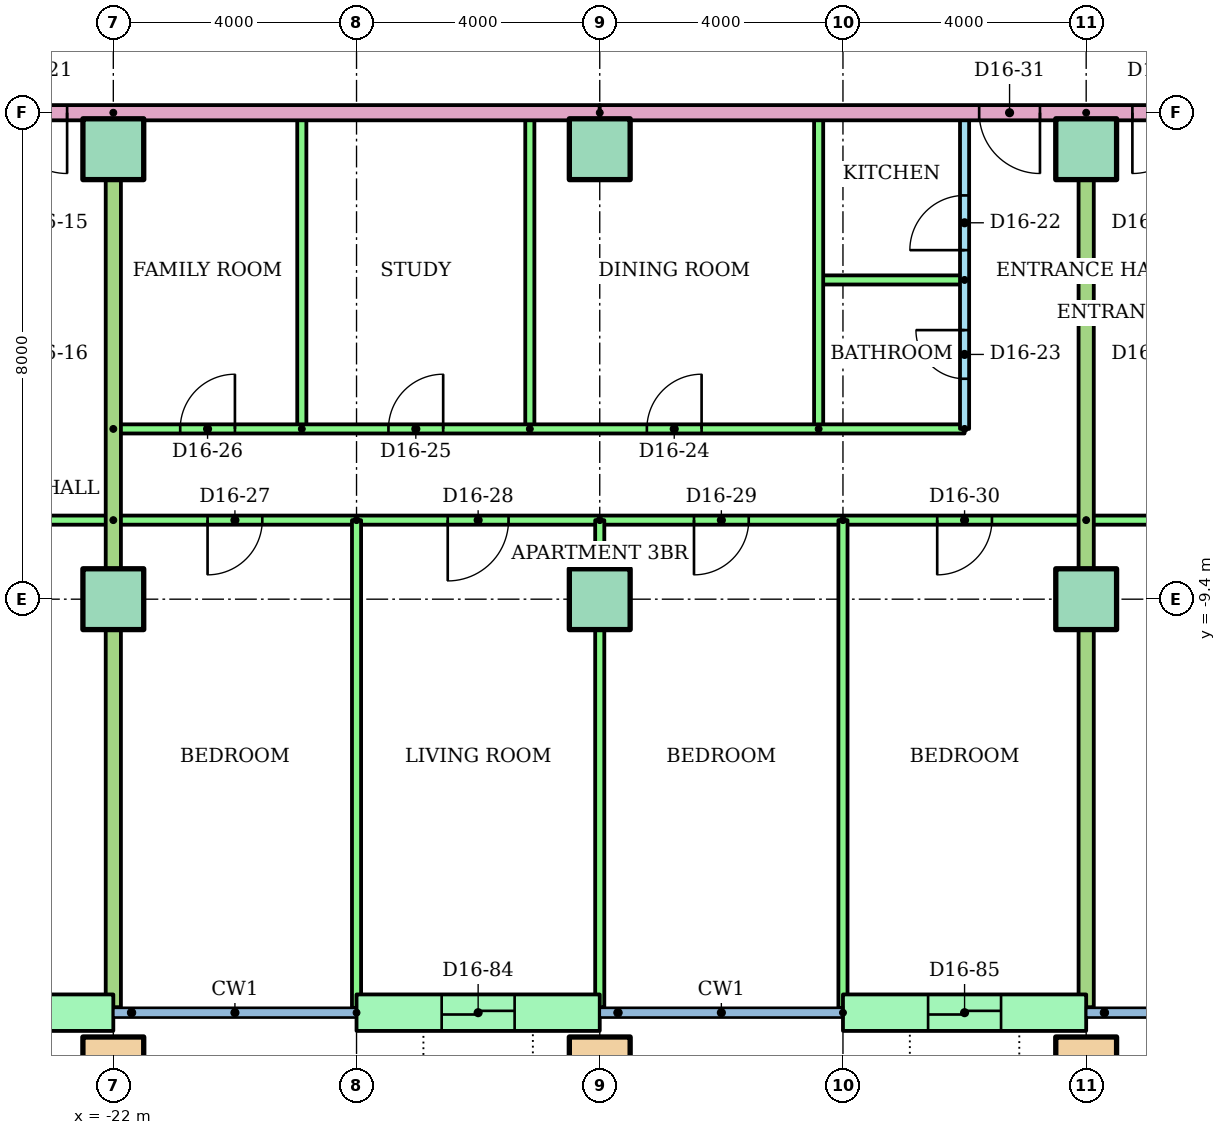
"""IFC4 building model, lengths in metres.
Left out: names, types, materials, properties, quantities, classifications, styles, units other than length and angle.
Written with IfcOpenShell. Run it as: python <this file> out.ifc"""

import sys

from ifc_helpers import new_model, si_unit, direction, frame, frame_2d, origin, origin_2d, place, context, subcontext, project, spatial, rectangle, hollow_rectangle, extrude, element, fill, save


model = new_model("IFC4")
c1 = context("Model", 3, precision=1e-05, world=origin(), true_north=direction((0.0, 1.0)))
c2 = subcontext(c1, "Body", "Model", "MODEL_VIEW")
j1 = project(units=[si_unit("LENGTHUNIT", "METRE"), si_unit("PLANEANGLEUNIT", "RADIAN")], contexts=[c1])
p1 = place(None, origin())
s1 = spatial("IfcSite", under=j1, at=p1, CompositionType="ELEMENT")
p2 = place(p1, origin())
s2 = spatial("IfcBuilding", under=s1, at=p2, CompositionType="ELEMENT")
p3 = place(p2, frame((0.0, 0.0, 60.8)))
s3 = spatial("IfcBuildingStorey", under=s2, at=p3, CompositionType="ELEMENT", Elevation=60.8)
for number, where in (
    (1, (-22.0, -17.1, 0.0)),
    (2, (-14.0, -17.1, 0.0)),
    (3, (-6.0, -17.1, 0.0)),
):
    element("IfcColumn", number, at=place(p3, frame(where)), inside=s3, PredefinedType="COLUMN", context=c2, shape_type="SweptSolid", body=[
        extrude(hollow_rectangle(XDim=1.0, YDim=1.0, WallThickness=0.05, at=origin_2d()), origin(), (0.0, 0.0, 1.0), 3.2),
    ])
for number, where in (
    (4, (-22.0, -9.4, 0.0)),
    (5, (-14.0, -9.4, 0.0)),
    (6, (-6.0, -9.4, 0.0)),
    (7, (-22.0, -2.0, 0.0)),
    (8, (-14.0, -2.0, 0.0)),
    (9, (-6.0, -2.0, 0.0)),
):
    element("IfcColumn", number, at=place(p3, frame(where)), inside=s3, PredefinedType="COLUMN", context=c2, shape_type="SweptSolid", body=[
        extrude(rectangle(XDim=1.0, YDim=1.0, at=origin_2d()), origin(), (0.0, 0.0, 1.0), 3.2),
    ])
p4 = place(p3, frame((-26.0, -16.2, 0.0)))
e10 = element("IfcWall", 10, at=p4, inside=s3, PredefinedType="STANDARD", context=c2, shape_type="SweptSolid", body=[
    extrude(rectangle(XDim=4.0, YDim=0.6, at=frame_2d((2.0, 0.0))), origin(), (0.0, 0.0, 1.0), 2.8),
])
p5 = place(p4, frame((1.4, 0.0, 0.0)))
e11 = element("IfcOpeningElement", 11, at=p5, cuts=e10, PredefinedType="OPENING", context=c2, shape_type="SweptSolid", body=[
    extrude(rectangle(XDim=1.2, YDim=2.1, at=frame_2d((0.6, 1.05))), frame((0.0, 0.31, 0.0), z_axis=(0.0, -1.0, 0.0), x_axis=(1.0, 0.0, 0.0)), (0.0, 0.0, 1.0), 0.62),
])
p6 = place(p3, frame((-18.0, -16.2, 0.0)))
e12 = element("IfcWall", 12, at=p6, inside=s3, PredefinedType="STANDARD", context=c2, shape_type="SweptSolid", body=[
    extrude(rectangle(XDim=4.0, YDim=0.6, at=frame_2d((2.0, 0.0))), origin(), (0.0, 0.0, 1.0), 2.8),
])
p7 = place(p6, frame((1.4, 0.0, 0.0)))
e13 = element("IfcOpeningElement", 13, at=p7, cuts=e12, PredefinedType="OPENING", context=c2, shape_type="SweptSolid", body=[
    extrude(rectangle(XDim=1.2, YDim=2.1, at=frame_2d((0.6, 1.05))), frame((0.0, 0.31, 0.0), z_axis=(0.0, -1.0, 0.0), x_axis=(1.0, 0.0, 0.0)), (0.0, 0.0, 1.0), 0.62),
])
p8 = place(p3, frame((-10.0, -16.2, 0.0)))
e14 = element("IfcWall", 14, at=p8, inside=s3, PredefinedType="STANDARD", context=c2, shape_type="SweptSolid", body=[
    extrude(rectangle(XDim=4.0, YDim=0.6, at=frame_2d((2.0, 0.0))), origin(), (0.0, 0.0, 1.0), 2.8),
])
p9 = place(p8, frame((1.4, 0.0, 0.0)))
e15 = element("IfcOpeningElement", 15, at=p9, cuts=e14, PredefinedType="OPENING", context=c2, shape_type="SweptSolid", body=[
    extrude(rectangle(XDim=1.2, YDim=2.1, at=frame_2d((0.6, 1.05))), frame((0.0, 0.31, 0.0), z_axis=(0.0, -1.0, 0.0), x_axis=(1.0, 0.0, 0.0)), (0.0, 0.0, 1.0), 0.62),
])
p10 = place(p3, frame((-22.0, -8.1, 0.0), z_axis=(0.0, 0.0, 1.0), x_axis=(-1.0, 0.0, 0.0)))
e16 = element("IfcWall", 16, at=p10, inside=s3, PredefinedType="PARTITIONING", context=c2, shape_type="SweptSolid", body=[
    extrude(rectangle(XDim=14.51, YDim=0.15, at=frame_2d((7.255, 0.0))), origin(), (0.0, 0.0, 1.0), 2.4),
])
p11 = place(p10, frame((11.6, 0.0, 0.0)))
e17 = element("IfcOpeningElement", 17, at=p11, cuts=e16, PredefinedType="OPENING", context=c2, shape_type="SweptSolid", body=[
    extrude(rectangle(XDim=0.9, YDim=2.1, at=frame_2d((0.45, 1.05))), frame((0.0, 0.085, 0.0), z_axis=(0.0, -1.0, 0.0), x_axis=(1.0, 0.0, 0.0)), (0.0, 0.0, 1.0), 0.17),
])
p12 = place(p10, frame((4.4, 0.0, 0.0)))
e18 = element("IfcOpeningElement", 18, at=p12, cuts=e16, PredefinedType="OPENING", context=c2, shape_type="SweptSolid", body=[
    extrude(rectangle(XDim=1.0, YDim=2.1, at=frame_2d((0.5, 1.05))), frame((0.0, 0.085, 0.0), z_axis=(0.0, -1.0, 0.0), x_axis=(1.0, 0.0, 0.0)), (0.0, 0.0, 1.0), 0.17),
])
p13 = place(p3, frame((-8.0, -6.6, 0.0), z_axis=(0.0, 0.0, 1.0), x_axis=(0.0, 1.0, 0.0)))
e19 = element("IfcWall", 19, at=p13, inside=s3, PredefinedType="PARTITIONING", context=c2, shape_type="SweptSolid", body=[
    extrude(rectangle(XDim=5.2, YDim=0.15, at=frame_2d((2.6, 0.0))), origin(), (0.0, 0.0, 1.0), 2.4),
])
p14 = place(p13, frame((2.94, 0.0, 0.0)))
e20 = element("IfcOpeningElement", 20, at=p14, cuts=e19, PredefinedType="OPENING", context=c2, shape_type="SweptSolid", body=[
    extrude(rectangle(XDim=0.9, YDim=2.1, at=frame_2d((0.45, 1.05))), frame((0.0, 0.085, 0.0), z_axis=(0.0, -1.0, 0.0), x_axis=(1.0, 0.0, 0.0)), (0.0, 0.0, 1.0), 0.17),
])
p15 = place(p13, frame((0.825, 0.0, 0.0)))
e21 = element("IfcOpeningElement", 21, at=p15, cuts=e19, PredefinedType="OPENING", context=c2, shape_type="SweptSolid", body=[
    extrude(rectangle(XDim=0.8, YDim=2.1, at=frame_2d((0.4, 1.05))), frame((0.0, 0.085, 0.0), z_axis=(0.0, -1.0, 0.0), x_axis=(1.0, 0.0, 0.0)), (0.0, 0.0, 1.0), 0.17),
])
p16 = place(p3, frame((-8.0, -4.15, 0.0), z_axis=(0.0, 0.0, 1.0), x_axis=(-1.0, 0.0, 0.0)))
e22 = element("IfcWall", 22, at=p16, inside=s3, PredefinedType="PARTITIONING", context=c2, shape_type="SweptSolid", body=[
    extrude(rectangle(XDim=2.4, YDim=0.15, at=frame_2d((1.2, 0.0))), origin(), (0.0, 0.0, 1.0), 2.4),
])
for number, where, z_axis, x_axis in (
    (23, (-10.4, -6.6, 0.0), (0.0, 0.0, 1.0), (0.0, 1.0, 0.0)),
    (24, (-15.15, -6.6, 0.0), (0.0, 0.0, 1.0), (0.0, 1.0, 0.0)),
    (25, (-18.9, -6.6, 0.0), (0.0, 0.0, 1.0), (0.0, 1.0, 0.0)),
):
    element("IfcWall", number, at=place(p3, frame(where, z_axis=z_axis, x_axis=x_axis)), inside=s3, PredefinedType="PARTITIONING", context=c2, shape_type="SweptSolid", body=[
        extrude(rectangle(XDim=5.2, YDim=0.15, at=frame_2d((2.6, 0.0))), origin(), (0.0, 0.0, 1.0), 2.4),
    ])
p17 = place(p3, frame((-22.0, -6.6, 0.0)))
e26 = element("IfcWall", 26, at=p17, inside=s3, PredefinedType="PARTITIONING", context=c2, shape_type="SweptSolid", body=[
    extrude(rectangle(XDim=14.0, YDim=0.15, at=frame_2d((7.0, 0.0))), origin(), (0.0, 0.0, 1.0), 2.4),
])
p18 = place(p17, frame((8.775, 0.0, 0.0)))
e27 = element("IfcOpeningElement", 27, at=p18, cuts=e26, PredefinedType="OPENING", context=c2, shape_type="SweptSolid", body=[
    extrude(rectangle(XDim=0.9, YDim=2.1, at=frame_2d((0.45, 1.05))), frame((0.0, 0.085, 0.0), z_axis=(0.0, -1.0, 0.0), x_axis=(1.0, 0.0, 0.0)), (0.0, 0.0, 1.0), 0.17),
])
p19 = place(p17, frame((4.525, 0.0, 0.0)))
e28 = element("IfcOpeningElement", 28, at=p19, cuts=e26, PredefinedType="OPENING", context=c2, shape_type="SweptSolid", body=[
    extrude(rectangle(XDim=0.9, YDim=2.1, at=frame_2d((0.45, 1.05))), frame((0.0, 0.085, 0.0), z_axis=(0.0, -1.0, 0.0), x_axis=(1.0, 0.0, 0.0)), (0.0, 0.0, 1.0), 0.17),
])
p20 = place(p17, frame((1.1, 0.0, 0.0)))
e29 = element("IfcOpeningElement", 29, at=p20, cuts=e26, PredefinedType="OPENING", context=c2, shape_type="SweptSolid", body=[
    extrude(rectangle(XDim=0.9, YDim=2.1, at=frame_2d((0.45, 1.05))), frame((0.0, 0.085, 0.0), z_axis=(0.0, -1.0, 0.0), x_axis=(1.0, 0.0, 0.0)), (0.0, 0.0, 1.0), 0.17),
])
p21 = place(p3, frame((-6.0, -8.1, 0.0), z_axis=(0.0, 0.0, 1.0), x_axis=(-1.0, 0.0, 0.0)))
e30 = element("IfcWall", 30, at=p21, inside=s3, PredefinedType="PARTITIONING", context=c2, shape_type="SweptSolid", body=[
    extrude(rectangle(XDim=16.0, YDim=0.15, at=frame_2d((8.0, 0.0))), origin(), (0.0, 0.0, 1.0), 2.4),
])
p22 = place(p21, frame((13.55, 0.0, 0.0)))
e31 = element("IfcOpeningElement", 31, at=p22, cuts=e30, PredefinedType="OPENING", context=c2, shape_type="SweptSolid", body=[
    extrude(rectangle(XDim=0.9, YDim=2.1, at=frame_2d((0.45, 1.05))), frame((0.0, 0.085, 0.0), z_axis=(0.0, -1.0, 0.0), x_axis=(1.0, 0.0, 0.0)), (0.0, 0.0, 1.0), 0.17),
])
p23 = place(p21, frame((9.5, 0.0, 0.0)))
e32 = element("IfcOpeningElement", 32, at=p23, cuts=e30, PredefinedType="OPENING", context=c2, shape_type="SweptSolid", body=[
    extrude(rectangle(XDim=1.0, YDim=2.1, at=frame_2d((0.5, 1.05))), frame((0.0, 0.085, 0.0), z_axis=(0.0, -1.0, 0.0), x_axis=(1.0, 0.0, 0.0)), (0.0, 0.0, 1.0), 0.17),
])
p24 = place(p21, frame((5.55, 0.0, 0.0)))
e33 = element("IfcOpeningElement", 33, at=p24, cuts=e30, PredefinedType="OPENING", context=c2, shape_type="SweptSolid", body=[
    extrude(rectangle(XDim=0.9, YDim=2.1, at=frame_2d((0.45, 1.05))), frame((0.0, 0.085, 0.0), z_axis=(0.0, -1.0, 0.0), x_axis=(1.0, 0.0, 0.0)), (0.0, 0.0, 1.0), 0.17),
])
p25 = place(p21, frame((1.55, 0.0, 0.0)))
e34 = element("IfcOpeningElement", 34, at=p25, cuts=e30, PredefinedType="OPENING", context=c2, shape_type="SweptSolid", body=[
    extrude(rectangle(XDim=0.9, YDim=2.1, at=frame_2d((0.45, 1.05))), frame((0.0, 0.085, 0.0), z_axis=(0.0, -1.0, 0.0), x_axis=(1.0, 0.0, 0.0)), (0.0, 0.0, 1.0), 0.17),
])
p26 = place(p3, frame((-18.0, -8.1, 0.0), z_axis=(0.0, 0.0, 1.0), x_axis=(0.0, -1.0, 0.0)))
e35 = element("IfcWall", 35, at=p26, inside=s3, PredefinedType="PARTITIONING", context=c2, shape_type="SweptSolid", body=[
    extrude(rectangle(XDim=8.021, YDim=0.15, at=frame_2d((4.01, 0.0))), origin(), (0.0, 0.0, 1.0), 2.4),
])
p27 = place(p3, frame((-14.0, -8.1, 0.0), z_axis=(0.0, 0.0, 1.0), x_axis=(0.0, -1.0, 0.0)))
e36 = element("IfcWall", 36, at=p27, inside=s3, PredefinedType="PARTITIONING", context=c2, shape_type="SweptSolid", body=[
    extrude(rectangle(XDim=8.01, YDim=0.15, at=frame_2d((4.005, 0.0))), origin(), (0.0, 0.0, 1.0), 2.4),
])
p28 = place(p3, frame((-10.0, -8.1, 0.0), z_axis=(0.0, 0.0, 1.0), x_axis=(0.0, -1.0, 0.0)))
e37 = element("IfcWall", 37, at=p28, inside=s3, PredefinedType="PARTITIONING", context=c2, shape_type="SweptSolid", body=[
    extrude(rectangle(XDim=8.021, YDim=0.15, at=frame_2d((4.01, 0.0))), origin(), (0.0, 0.0, 1.0), 2.4),
])
p29 = place(p3, frame((-22.0, -1.4, 0.0), z_axis=(0.0, 0.0, 1.0), x_axis=(0.0, -1.0, 0.0)))
e38 = element("IfcWall", 38, at=p29, inside=s3, PredefinedType="PARTITIONING", context=c2, shape_type="SweptSolid", body=[
    extrude(rectangle(XDim=14.71, YDim=0.25, at=frame_2d((7.355, 0.0))), origin(), (0.0, 0.0, 1.0), 2.4),
])
p30 = place(p3, frame((10.0, -8.1, 0.0), z_axis=(0.0, 0.0, 1.0), x_axis=(-1.0, 0.0, 0.0)))
e39 = element("IfcWall", 39, at=p30, inside=s3, PredefinedType="PARTITIONING", context=c2, shape_type="SweptSolid", body=[
    extrude(rectangle(XDim=16.0, YDim=0.15, at=frame_2d((8.0, 0.0))), origin(), (0.0, 0.0, 1.0), 2.4),
])
p31 = place(p30, frame((13.55, 0.0, 0.0)))
e40 = element("IfcOpeningElement", 40, at=p31, cuts=e39, PredefinedType="OPENING", context=c2, shape_type="SweptSolid", body=[
    extrude(rectangle(XDim=0.9, YDim=2.1, at=frame_2d((0.45, 1.05))), frame((0.0, 0.085, 0.0), z_axis=(0.0, -1.0, 0.0), x_axis=(1.0, 0.0, 0.0)), (0.0, 0.0, 1.0), 0.17),
])
p32 = place(p30, frame((9.5, 0.0, 0.0)))
e41 = element("IfcOpeningElement", 41, at=p32, cuts=e39, PredefinedType="OPENING", context=c2, shape_type="SweptSolid", body=[
    extrude(rectangle(XDim=1.0, YDim=2.1, at=frame_2d((0.5, 1.05))), frame((0.0, 0.085, 0.0), z_axis=(0.0, -1.0, 0.0), x_axis=(1.0, 0.0, 0.0)), (0.0, 0.0, 1.0), 0.17),
])
p33 = place(p30, frame((5.55, 0.0, 0.0)))
e42 = element("IfcOpeningElement", 42, at=p33, cuts=e39, PredefinedType="OPENING", context=c2, shape_type="SweptSolid", body=[
    extrude(rectangle(XDim=0.9, YDim=2.1, at=frame_2d((0.45, 1.05))), frame((0.0, 0.085, 0.0), z_axis=(0.0, -1.0, 0.0), x_axis=(1.0, 0.0, 0.0)), (0.0, 0.0, 1.0), 0.17),
])
p34 = place(p30, frame((1.55, 0.0, 0.0)))
e43 = element("IfcOpeningElement", 43, at=p34, cuts=e39, PredefinedType="OPENING", context=c2, shape_type="SweptSolid", body=[
    extrude(rectangle(XDim=0.9, YDim=2.1, at=frame_2d((0.45, 1.05))), frame((0.0, 0.085, 0.0), z_axis=(0.0, -1.0, 0.0), x_axis=(1.0, 0.0, 0.0)), (0.0, 0.0, 1.0), 0.17),
])
p35 = place(p3, frame((-6.0, -1.4, 0.0), z_axis=(0.0, 0.0, 1.0), x_axis=(0.0, -1.0, 0.0)))
e44 = element("IfcWall", 44, at=p35, inside=s3, PredefinedType="PARTITIONING", context=c2, shape_type="SweptSolid", body=[
    extrude(rectangle(XDim=14.71, YDim=0.25, at=frame_2d((7.355, 0.0))), origin(), (0.0, 0.0, 1.0), 2.4),
])
p36 = place(p3, frame((-14.0, -1.4, 0.0), z_axis=(0.0, 0.0, 1.0), x_axis=(-1.0, 0.0, 0.0)))
e45 = element("IfcWall", 45, at=p36, inside=s3, PredefinedType="PARTITIONING", context=c2, shape_type="SweptSolid", body=[
    extrude(rectangle(XDim=15.0, YDim=0.25, at=frame_2d((7.5, 0.0))), origin(), (0.0, 0.0, 1.0), 2.4),
])
p37 = place(p36, frame((8.76, 0.0, 0.0)))
e46 = element("IfcOpeningElement", 46, at=p37, cuts=e45, PredefinedType="OPENING", context=c2, shape_type="SweptSolid", body=[
    extrude(rectangle(XDim=1.0, YDim=2.1, at=frame_2d((0.5, 1.05))), frame((0.0, 0.135, 0.0), z_axis=(0.0, -1.0, 0.0), x_axis=(1.0, 0.0, 0.0)), (0.0, 0.0, 1.0), 0.27),
])
p38 = place(p3, frame((14.0, -1.4, 0.0), z_axis=(0.0, 0.0, 1.0), x_axis=(-1.0, 0.0, 0.0)))
e47 = element("IfcWall", 47, at=p38, inside=s3, PredefinedType="PARTITIONING", context=c2, shape_type="SweptSolid", body=[
    extrude(rectangle(XDim=28.0, YDim=0.25, at=frame_2d((14.0, 0.0))), origin(), (0.0, 0.0, 1.0), 2.4),
])
p39 = place(p38, frame((20.76, 0.0, 0.0)))
e48 = element("IfcOpeningElement", 48, at=p39, cuts=e47, PredefinedType="OPENING", context=c2, shape_type="SweptSolid", body=[
    extrude(rectangle(XDim=1.0, YDim=2.1, at=frame_2d((0.5, 1.05))), frame((0.0, 0.135, 0.0), z_axis=(0.0, -1.0, 0.0), x_axis=(1.0, 0.0, 0.0)), (0.0, 0.0, 1.0), 0.27),
])
p40 = place(p38, frame((18.24, 0.0, 0.0)))
e49 = element("IfcOpeningElement", 49, at=p40, cuts=e47, PredefinedType="OPENING", context=c2, shape_type="SweptSolid", body=[
    extrude(rectangle(XDim=1.0, YDim=2.1, at=frame_2d((0.5, 1.05))), frame((0.0, 0.135, 0.0), z_axis=(0.0, -1.0, 0.0), x_axis=(1.0, 0.0, 0.0)), (0.0, 0.0, 1.0), 0.27),
])
p41 = place(p38, frame((2.24, 0.0, 0.0)))
e50 = element("IfcOpeningElement", 50, at=p41, cuts=e47, PredefinedType="OPENING", context=c2, shape_type="SweptSolid", body=[
    extrude(rectangle(XDim=1.0, YDim=2.1, at=frame_2d((0.5, 1.05))), frame((0.0, 0.135, 0.0), z_axis=(0.0, -1.0, 0.0), x_axis=(1.0, 0.0, 0.0)), (0.0, 0.0, 1.0), 0.27),
])
p42 = place(p37, origin())
e51 = element("IfcDoor", 51, at=p42, inside=s3, OperationType="SINGLE_SWING_LEFT", PredefinedType="DOOR", context=c2, shape_type="SweptSolid", body=[
    extrude(rectangle(XDim=1.0, YDim=2.1, at=frame_2d((0.5, 1.05))), frame((0.0, 0.025, 0.0), z_axis=(0.0, -1.0, 0.0), x_axis=(1.0, 0.0, 0.0)), (0.0, 0.0, 1.0), 0.05),
])
fill(e46, e51)
p43 = place(p14, origin())
e52 = element("IfcDoor", 52, at=p43, inside=s3, OperationType="SINGLE_SWING_LEFT", PredefinedType="DOOR", context=c2, shape_type="SweptSolid", body=[
    extrude(rectangle(XDim=0.9, YDim=2.1, at=frame_2d((0.45, 1.05))), frame((0.0, 0.025, 0.0), z_axis=(0.0, -1.0, 0.0), x_axis=(1.0, 0.0, 0.0)), (0.0, 0.0, 1.0), 0.05),
])
fill(e20, e52)
p44 = place(p15, origin())
e53 = element("IfcDoor", 53, at=p44, inside=s3, OperationType="SINGLE_SWING_RIGHT", PredefinedType="DOOR", context=c2, shape_type="SweptSolid", body=[
    extrude(rectangle(XDim=0.8, YDim=2.1, at=frame_2d((0.4, 1.05))), frame((0.0, 0.025, 0.0), z_axis=(0.0, -1.0, 0.0), x_axis=(1.0, 0.0, 0.0)), (0.0, 0.0, 1.0), 0.05),
])
fill(e21, e53)
p45 = place(p18, origin())
e54 = element("IfcDoor", 54, at=p45, inside=s3, OperationType="SINGLE_SWING_RIGHT", PredefinedType="DOOR", context=c2, shape_type="SweptSolid", body=[
    extrude(rectangle(XDim=0.9, YDim=2.1, at=frame_2d((0.45, 1.05))), frame((0.0, 0.025, 0.0), z_axis=(0.0, -1.0, 0.0), x_axis=(1.0, 0.0, 0.0)), (0.0, 0.0, 1.0), 0.05),
])
fill(e27, e54)
p46 = place(p19, origin())
e55 = element("IfcDoor", 55, at=p46, inside=s3, OperationType="SINGLE_SWING_RIGHT", PredefinedType="DOOR", context=c2, shape_type="SweptSolid", body=[
    extrude(rectangle(XDim=0.9, YDim=2.1, at=frame_2d((0.45, 1.05))), frame((0.0, 0.025, 0.0), z_axis=(0.0, -1.0, 0.0), x_axis=(1.0, 0.0, 0.0)), (0.0, 0.0, 1.0), 0.05),
])
fill(e28, e55)
p47 = place(p20, origin())
e56 = element("IfcDoor", 56, at=p47, inside=s3, OperationType="SINGLE_SWING_RIGHT", PredefinedType="DOOR", context=c2, shape_type="SweptSolid", body=[
    extrude(rectangle(XDim=0.9, YDim=2.1, at=frame_2d((0.45, 1.05))), frame((0.0, 0.025, 0.0), z_axis=(0.0, -1.0, 0.0), x_axis=(1.0, 0.0, 0.0)), (0.0, 0.0, 1.0), 0.05),
])
fill(e29, e56)
p48 = place(p22, origin())
e57 = element("IfcDoor", 57, at=p48, inside=s3, OperationType="SINGLE_SWING_RIGHT", PredefinedType="DOOR", context=c2, shape_type="SweptSolid", body=[
    extrude(rectangle(XDim=0.9, YDim=2.1, at=frame_2d((0.45, 1.05))), frame((0.0, 0.025, 0.0), z_axis=(0.0, -1.0, 0.0), x_axis=(1.0, 0.0, 0.0)), (0.0, 0.0, 1.0), 0.05),
])
fill(e31, e57)
p49 = place(p23, origin())
e58 = element("IfcDoor", 58, at=p49, inside=s3, OperationType="SINGLE_SWING_RIGHT", PredefinedType="DOOR", context=c2, shape_type="SweptSolid", body=[
    extrude(rectangle(XDim=1.0, YDim=2.1, at=frame_2d((0.5, 1.05))), frame((0.0, 0.025, 0.0), z_axis=(0.0, -1.0, 0.0), x_axis=(1.0, 0.0, 0.0)), (0.0, 0.0, 1.0), 0.05),
])
fill(e32, e58)
p50 = place(p24, origin())
e59 = element("IfcDoor", 59, at=p50, inside=s3, OperationType="SINGLE_SWING_RIGHT", PredefinedType="DOOR", context=c2, shape_type="SweptSolid", body=[
    extrude(rectangle(XDim=0.9, YDim=2.1, at=frame_2d((0.45, 1.05))), frame((0.0, 0.025, 0.0), z_axis=(0.0, -1.0, 0.0), x_axis=(1.0, 0.0, 0.0)), (0.0, 0.0, 1.0), 0.05),
])
fill(e33, e59)
p51 = place(p25, origin())
e60 = element("IfcDoor", 60, at=p51, inside=s3, OperationType="SINGLE_SWING_RIGHT", PredefinedType="DOOR", context=c2, shape_type="SweptSolid", body=[
    extrude(rectangle(XDim=0.9, YDim=2.1, at=frame_2d((0.45, 1.05))), frame((0.0, 0.025, 0.0), z_axis=(0.0, -1.0, 0.0), x_axis=(1.0, 0.0, 0.0)), (0.0, 0.0, 1.0), 0.05),
])
fill(e34, e60)
p52 = place(p39, origin())
e61 = element("IfcDoor", 61, at=p52, inside=s3, OperationType="SINGLE_SWING_LEFT", PredefinedType="DOOR", context=c2, shape_type="SweptSolid", body=[
    extrude(rectangle(XDim=1.0, YDim=2.1, at=frame_2d((0.5, 1.05))), frame((0.0, 0.025, 0.0), z_axis=(0.0, -1.0, 0.0), x_axis=(1.0, 0.0, 0.0)), (0.0, 0.0, 1.0), 0.05),
])
fill(e48, e61)
p53 = place(p40, origin())
e62 = element("IfcDoor", 62, at=p53, inside=s3, OperationType="SINGLE_SWING_RIGHT", PredefinedType="DOOR", context=c2, shape_type="SweptSolid", body=[
    extrude(rectangle(XDim=1.0, YDim=2.1, at=frame_2d((0.5, 1.05))), frame((0.0, 0.025, 0.0), z_axis=(0.0, -1.0, 0.0), x_axis=(1.0, 0.0, 0.0)), (0.0, 0.0, 1.0), 0.05),
])
fill(e49, e62)
p54 = place(p7, origin())
e63 = element("IfcDoor", 63, at=p54, inside=s3, OperationType="SLIDING_TO_LEFT", PredefinedType="DOOR", context=c2, shape_type="SweptSolid", body=[
    extrude(rectangle(XDim=1.2, YDim=2.1, at=frame_2d((0.6, 1.05))), frame((0.0, 0.025, 0.0), z_axis=(0.0, -1.0, 0.0), x_axis=(1.0, 0.0, 0.0)), (0.0, 0.0, 1.0), 0.05),
])
fill(e13, e63)
p55 = place(p9, origin())
e64 = element("IfcDoor", 64, at=p55, inside=s3, OperationType="SLIDING_TO_LEFT", PredefinedType="DOOR", context=c2, shape_type="SweptSolid", body=[
    extrude(rectangle(XDim=1.2, YDim=2.1, at=frame_2d((0.6, 1.05))), frame((0.0, 0.025, 0.0), z_axis=(0.0, -1.0, 0.0), x_axis=(1.0, 0.0, 0.0)), (0.0, 0.0, 1.0), 0.05),
])
fill(e15, e64)
save(model, sys.argv[1])
